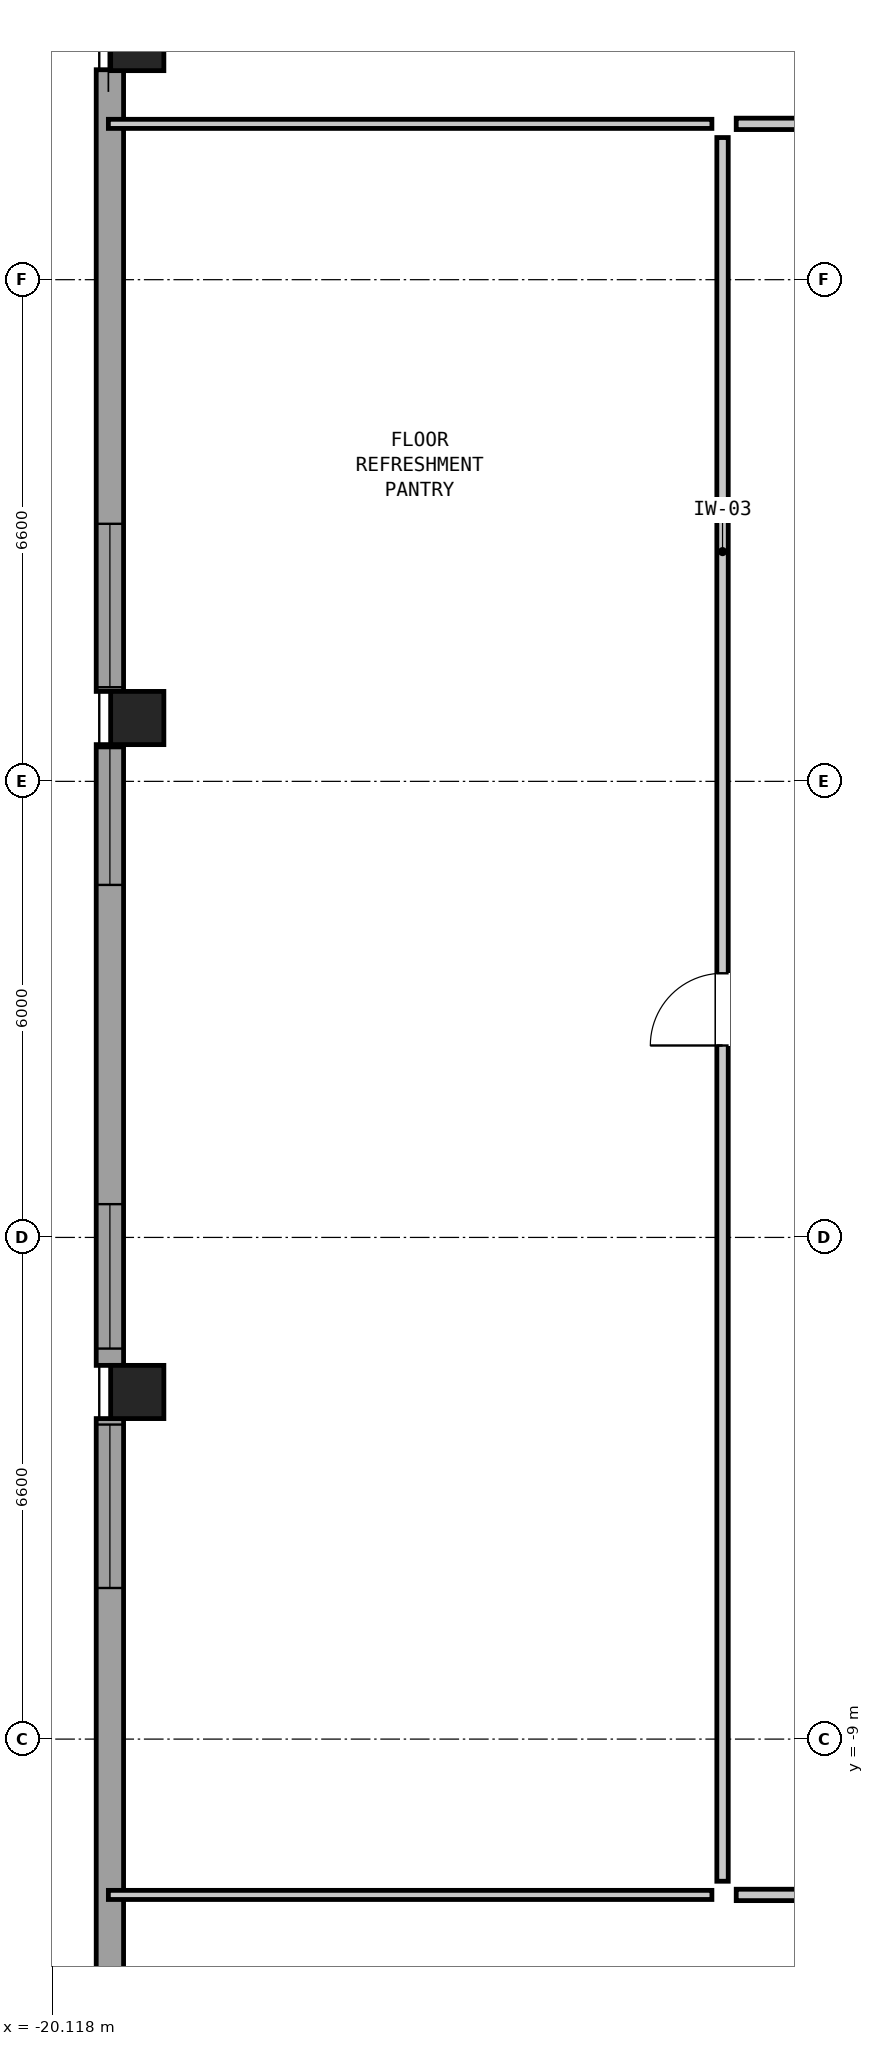
"""IFC4 building model, lengths in metres.
Left out: names, types, materials, properties, quantities, classifications, styles, units other than length and angle.
Written with IfcOpenShell. Run it as: python <this file> out.ifc"""

import sys

from ifc_helpers import new_model, si_unit, direction, frame, frame_2d, origin, origin_2d, place, context, subcontext, project, spatial, rectangle, hollow_rectangle, extrude, element, fill, save


model = new_model("IFC4")
c1 = context("Model", 3, precision=1e-05, world=origin(), true_north=direction((0.0, 1.0)))
c2 = subcontext(c1, "Body", "Model", "MODEL_VIEW")
j1 = project(units=[si_unit("LENGTHUNIT", "METRE"), si_unit("PLANEANGLEUNIT", "RADIAN")], contexts=[c1])
p1 = place(None, origin())
s1 = spatial("IfcSite", under=j1, at=p1, CompositionType="ELEMENT")
p2 = place(p1, origin())
s2 = spatial("IfcBuilding", under=s1, at=p2, CompositionType="ELEMENT")
p3 = place(p2, frame((0.0, 0.0, 199.5)))
s3 = spatial("IfcBuildingStorey", under=s2, at=p3, CompositionType="ELEMENT", Elevation=199.5)
for number, where, z_axis, x_axis in (
    (1, (-19.0, 13.3, 0.0), (0.0, 0.0, 1.0), (0.0, 1.0, 0.0)),
    (2, (-19.0, 4.433, 0.0), (0.0, 0.0, 1.0), (0.0, 1.0, 0.0)),
    (3, (-19.0, -4.433, 0.0), (0.0, 0.0, 1.0), (0.0, 1.0, 0.0)),
):
    element("IfcColumn", number, at=place(p3, frame(where, z_axis=z_axis, x_axis=x_axis)), inside=s3, PredefinedType="COLUMN", context=c2, shape_type="SweptSolid", body=[
        extrude(hollow_rectangle(XDim=0.7, YDim=0.7, WallThickness=0.045, at=origin_2d()), origin(), (0.0, 0.0, 1.0), 3.05),
    ])
p4 = place(p3, frame((-19.36, -12.962, 0.0), z_axis=(0.0, 0.0, 1.0), x_axis=(0.0, 1.0, 0.0)))
e4 = element("IfcWall", 4, at=p4, inside=s3, PredefinedType="SOLIDWALL", context=c2, shape_type="SweptSolid", body=[
    extrude(rectangle(XDim=8.179, YDim=0.36, at=frame_2d((4.089, 0.0))), origin(), (0.0, 0.0, 1.0), 1.662),
])
p5 = place(p4, frame((5.95, 0.0, 0.2)))
e5 = element("IfcOpeningElement", 5, at=p5, cuts=e4, PredefinedType="OPENING", context=c2, shape_type="SweptSolid", body=[
    extrude(rectangle(XDim=2.15, YDim=1.05, at=frame_2d((1.075, 0.525))), frame((0.0, 0.192, 0.0), z_axis=(0.0, -1.0, 0.0), x_axis=(1.0, 0.0, 0.0)), (0.0, 0.0, 1.0), 0.384),
])
p6 = place(p3, frame((-19.36, -4.083, 0.0), z_axis=(0.0, 0.0, 1.0), x_axis=(0.0, 1.0, 0.0)))
e6 = element("IfcWall", 6, at=p6, inside=s3, PredefinedType="SOLIDWALL", context=c2, shape_type="SweptSolid", body=[
    extrude(rectangle(XDim=8.167, YDim=0.36, at=frame_2d((4.083, 0.0))), origin(), (0.0, 0.0, 1.0), 1.662),
])
p7 = place(p6, frame((0.221, 0.0, 0.2)))
e7 = element("IfcOpeningElement", 7, at=p7, cuts=e6, PredefinedType="OPENING", context=c2, shape_type="SweptSolid", body=[
    extrude(rectangle(XDim=1.9, YDim=0.9, at=frame_2d((0.95, 0.45))), frame((0.0, 0.192, 0.0), z_axis=(0.0, -1.0, 0.0), x_axis=(1.0, 0.0, 0.0)), (0.0, 0.0, 1.0), 0.384),
])
p8 = place(p6, frame((6.321, 0.0, 0.2)))
e8 = element("IfcOpeningElement", 8, at=p8, cuts=e6, PredefinedType="OPENING", context=c2, shape_type="SweptSolid", body=[
    extrude(rectangle(XDim=1.8, YDim=1.05, at=frame_2d((0.9, 0.525))), frame((0.0, 0.192, 0.0), z_axis=(0.0, -1.0, 0.0), x_axis=(1.0, 0.0, 0.0)), (0.0, 0.0, 1.0), 0.384),
])
p9 = place(p3, frame((-19.36, 4.783, 0.0), z_axis=(0.0, 0.0, 1.0), x_axis=(0.0, 1.0, 0.0)))
e9 = element("IfcWall", 9, at=p9, inside=s3, PredefinedType="SOLIDWALL", context=c2, shape_type="SweptSolid", body=[
    extrude(rectangle(XDim=8.179, YDim=0.36, at=frame_2d((4.089, 0.0))), origin(), (0.0, 0.0, 1.0), 1.662),
])
p10 = place(p9, frame((0.055, 0.0, 0.2)))
e10 = element("IfcOpeningElement", 10, at=p10, cuts=e9, PredefinedType="OPENING", context=c2, shape_type="SweptSolid", body=[
    extrude(rectangle(XDim=2.15, YDim=1.05, at=frame_2d((1.075, 0.525))), frame((0.0, 0.192, 0.0), z_axis=(0.0, -1.0, 0.0), x_axis=(1.0, 0.0, 0.0)), (0.0, 0.0, 1.0), 0.384),
])
for number, where, z_axis, x_axis in (
    (11, (-19.38, 12.25, 0.0), (0.0, 0.0, 1.0), (1.0, 0.0, 0.0)),
    (12, (-19.38, -11.05, 0.0), (0.0, 0.0, 1.0), (1.0, 0.0, 0.0)),
):
    element("IfcWall", number, at=place(p3, frame(where, z_axis=z_axis, x_axis=x_axis)), inside=s3, PredefinedType="PARTITIONING", context=c2, shape_type="SweptSolid", body=[
        extrude(rectangle(XDim=7.94, YDim=0.12, at=frame_2d((3.97, 0.0))), origin(), (0.0, 0.0, 1.0), 2.86),
    ])
p11 = place(p3, frame((-11.12, 12.25, 0.0), z_axis=(0.0, 0.0, 1.0), x_axis=(1.0, 0.0, 0.0)))
e13 = element("IfcWall", 13, at=p11, inside=s3, PredefinedType="PARTITIONING", context=c2, shape_type="SweptSolid", body=[
    extrude(rectangle(XDim=9.84, YDim=0.15, at=frame_2d((4.92, 0.0))), origin(), (0.0, 0.0, 1.0), 2.86),
])
p12 = place(p11, frame((4.445, 0.0, 0.0)))
e14 = element("IfcOpeningElement", 14, at=p12, cuts=e13, PredefinedType="OPENING", context=c2, shape_type="SweptSolid", body=[
    extrude(rectangle(XDim=0.95, YDim=2.1, at=frame_2d((0.475, 1.05))), frame((0.0, 0.087, 0.0), z_axis=(0.0, -1.0, 0.0), x_axis=(1.0, 0.0, 0.0)), (0.0, 0.0, 1.0), 0.174),
])
p13 = place(p3, frame((-11.12, -11.05, 0.0), z_axis=(0.0, 0.0, 1.0), x_axis=(1.0, 0.0, 0.0)))
e15 = element("IfcWall", 15, at=p13, inside=s3, PredefinedType="PARTITIONING", context=c2, shape_type="SweptSolid", body=[
    extrude(rectangle(XDim=22.59, YDim=0.15, at=frame_2d((11.295, 0.0))), origin(), (0.0, 0.0, 1.0), 2.86),
])
p14 = place(p13, frame((10.82, 0.0, 0.0)))
e16 = element("IfcOpeningElement", 16, at=p14, cuts=e15, PredefinedType="OPENING", context=c2, shape_type="SweptSolid", body=[
    extrude(rectangle(XDim=0.95, YDim=2.1, at=frame_2d((0.475, 1.05))), frame((0.0, 0.087, 0.0), z_axis=(0.0, -1.0, 0.0), x_axis=(1.0, 0.0, 0.0)), (0.0, 0.0, 1.0), 0.174),
])
p15 = place(p3, frame((-11.3, -10.87, 0.0), z_axis=(0.0, 0.0, 1.0), x_axis=(0.0, 1.0, 0.0)))
e17 = element("IfcWall", 17, at=p15, inside=s3, PredefinedType="PARTITIONING", context=c2, shape_type="SweptSolid", body=[
    extrude(rectangle(XDim=22.94, YDim=0.15, at=frame_2d((11.47, 0.0))), origin(), (0.0, 0.0, 1.0), 2.86),
])
p16 = place(p15, frame((10.995, 0.0, 0.0)))
e18 = element("IfcOpeningElement", 18, at=p16, cuts=e17, PredefinedType="OPENING", context=c2, shape_type="SweptSolid", body=[
    extrude(rectangle(XDim=0.95, YDim=2.1, at=frame_2d((0.475, 1.05))), frame((0.0, 0.087, 0.0), z_axis=(0.0, -1.0, 0.0), x_axis=(1.0, 0.0, 0.0)), (0.0, 0.0, 1.0), 0.174),
])
p17 = place(p5, origin())
e19 = element("IfcWindow", 19, at=p17, inside=s3, PartitioningType="SINGLE_PANEL", PredefinedType="WINDOW", context=c2, shape_type="SweptSolid", body=[
    extrude(rectangle(XDim=2.15, YDim=1.05, at=frame_2d((1.075, 0.525))), frame((0.0, 0.03, 0.0), z_axis=(0.0, -1.0, 0.0), x_axis=(1.0, 0.0, 0.0)), (0.0, 0.0, 1.0), 0.06),
])
fill(e5, e19)
p18 = place(p7, origin())
e20 = element("IfcWindow", 20, at=p18, inside=s3, PartitioningType="SINGLE_PANEL", PredefinedType="WINDOW", context=c2, shape_type="SweptSolid", body=[
    extrude(rectangle(XDim=1.9, YDim=0.9, at=frame_2d((0.95, 0.45))), frame((0.0, 0.03, 0.0), z_axis=(0.0, -1.0, 0.0), x_axis=(1.0, 0.0, 0.0)), (0.0, 0.0, 1.0), 0.06),
])
fill(e7, e20)
p19 = place(p8, origin())
e21 = element("IfcWindow", 21, at=p19, inside=s3, PartitioningType="SINGLE_PANEL", PredefinedType="WINDOW", context=c2, shape_type="SweptSolid", body=[
    extrude(rectangle(XDim=1.8, YDim=1.05, at=frame_2d((0.9, 0.525))), frame((0.0, 0.03, 0.0), z_axis=(0.0, -1.0, 0.0), x_axis=(1.0, 0.0, 0.0)), (0.0, 0.0, 1.0), 0.06),
])
fill(e8, e21)
p20 = place(p10, origin())
e22 = element("IfcWindow", 22, at=p20, inside=s3, PartitioningType="SINGLE_PANEL", PredefinedType="WINDOW", context=c2, shape_type="SweptSolid", body=[
    extrude(rectangle(XDim=2.15, YDim=1.05, at=frame_2d((1.075, 0.525))), frame((0.0, 0.03, 0.0), z_axis=(0.0, -1.0, 0.0), x_axis=(1.0, 0.0, 0.0)), (0.0, 0.0, 1.0), 0.06),
])
fill(e10, e22)
p21 = place(p16, origin())
e23 = element("IfcDoor", 23, at=p21, inside=s3, OperationType="SINGLE_SWING_LEFT", PredefinedType="DOOR", context=c2, shape_type="SweptSolid", body=[
    extrude(rectangle(XDim=0.95, YDim=2.1, at=frame_2d((0.475, 1.05))), frame((0.0, 0.025, 0.0), z_axis=(0.0, -1.0, 0.0), x_axis=(1.0, 0.0, 0.0)), (0.0, 0.0, 1.0), 0.05),
])
fill(e18, e23)
save(model, sys.argv[1])
